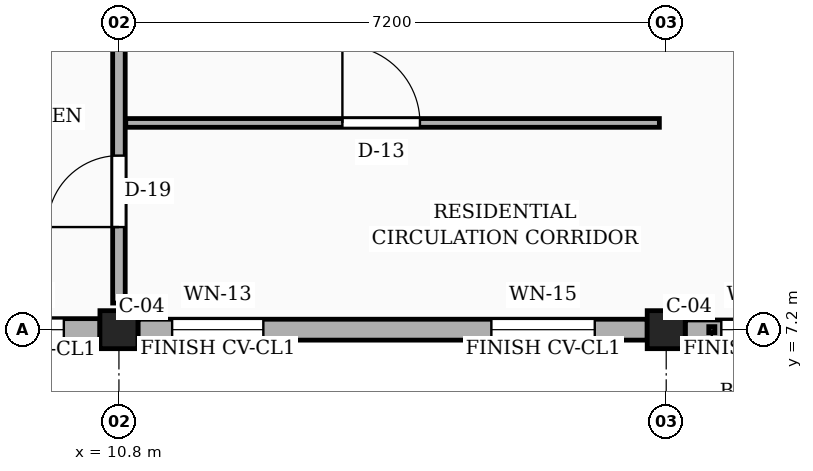
"""IFC4 building model, lengths in metres.
Left out: names, types, materials, properties, quantities, classifications, styles, units other than length and angle.
Written with IfcOpenShell. Run it as: python <this file> out.ifc"""

import sys

from ifc_helpers import new_model, si_unit, direction, frame, frame_2d, origin, origin_2d, place, context, subcontext, project, spatial, rectangle, extrude, element, fill, save


model = new_model("IFC4")
c1 = context("Model", 3, precision=1e-05, world=origin(), true_north=direction((0.0, 1.0)))
c2 = subcontext(c1, "Body", "Model", "MODEL_VIEW")
j1 = project(units=[si_unit("LENGTHUNIT", "METRE"), si_unit("PLANEANGLEUNIT", "RADIAN")], contexts=[c1])
p1 = place(None, origin())
s1 = spatial("IfcSite", under=j1, at=p1, CompositionType="ELEMENT")
p2 = place(p1, origin())
s2 = spatial("IfcBuilding", under=s1, at=p2, CompositionType="ELEMENT")
p3 = place(p2, frame((0.0, 0.0, 32.85)))
s3 = spatial("IfcBuildingStorey", under=s2, at=p3, CompositionType="ELEMENT", Elevation=32.85)
for number, where, z_axis, x_axis in (
    (1, (10.8, 7.2, 0.0), (0.0, 0.0, 1.0), (1.0, 0.0, 0.0)),
    (2, (18.0, 7.2, 0.0), (0.0, 0.0, 1.0), (1.0, 0.0, 0.0)),
):
    element("IfcColumn", number, at=place(p3, frame(where, z_axis=z_axis, x_axis=x_axis)), inside=s3, PredefinedType="COLUMN", context=c2, shape_type="SweptSolid", body=[
        extrude(rectangle(XDim=0.5, YDim=0.5, at=origin_2d()), origin(), (0.0, 0.0, 1.0), 3.15),
    ])
p4 = place(p3, frame((3.85, 7.2, 0.0), z_axis=(0.0, 0.0, 1.0), x_axis=(1.0, 0.0, 0.0)))
e3 = element("IfcWall", 3, at=p4, inside=s3, PredefinedType="SOLIDWALL", context=c2, shape_type="SweptSolid", body=[
    extrude(rectangle(XDim=6.7, YDim=0.29, at=frame_2d((3.35, 0.0))), origin(), (0.0, 0.0, 1.0), 2.44),
])
p5 = place(p4, frame((1.895, 0.0, 0.78)))
e4 = element("IfcOpeningElement", 4, at=p5, cuts=e3, PredefinedType="OPENING", context=c2, shape_type="SweptSolid", body=[
    extrude(rectangle(XDim=1.04, YDim=1.26, at=frame_2d((0.52, 0.63))), frame((0.0, 0.155, 0.0), z_axis=(0.0, -1.0, 0.0), x_axis=(1.0, 0.0, 0.0)), (0.0, 0.0, 1.0), 0.31),
])
p6 = place(p4, frame((5.025, 0.0, 0.78)))
e5 = element("IfcOpeningElement", 5, at=p6, cuts=e3, PredefinedType="OPENING", context=c2, shape_type="SweptSolid", body=[
    extrude(rectangle(XDim=1.2, YDim=1.26, at=frame_2d((0.6, 0.63))), frame((0.0, 0.155, 0.0), z_axis=(0.0, -1.0, 0.0), x_axis=(1.0, 0.0, 0.0)), (0.0, 0.0, 1.0), 0.31),
])
p7 = place(p3, frame((11.05, 7.2, 0.0), z_axis=(0.0, 0.0, 1.0), x_axis=(1.0, 0.0, 0.0)))
e6 = element("IfcWall", 6, at=p7, inside=s3, PredefinedType="SOLIDWALL", context=c2, shape_type="SweptSolid", body=[
    extrude(rectangle(XDim=6.7, YDim=0.275, at=frame_2d((3.35, 0.0))), origin(), (0.0, 0.0, 1.0), 2.44),
])
p8 = place(p7, frame((0.45, 0.0, 0.78)))
e7 = element("IfcOpeningElement", 7, at=p8, cuts=e6, PredefinedType="OPENING", context=c2, shape_type="SweptSolid", body=[
    extrude(rectangle(XDim=1.2, YDim=1.26, at=frame_2d((0.6, 0.63))), frame((0.0, 0.147, 0.0), z_axis=(0.0, -1.0, 0.0), x_axis=(1.0, 0.0, 0.0)), (0.0, 0.0, 1.0), 0.295),
])
p9 = place(p7, frame((4.65, 0.0, 0.78)))
e8 = element("IfcOpeningElement", 8, at=p9, cuts=e6, PredefinedType="OPENING", context=c2, shape_type="SweptSolid", body=[
    extrude(rectangle(XDim=1.36, YDim=1.26, at=frame_2d((0.68, 0.63))), frame((0.0, 0.147, 0.0), z_axis=(0.0, -1.0, 0.0), x_axis=(1.0, 0.0, 0.0)), (0.0, 0.0, 1.0), 0.295),
])
p10 = place(p3, frame((18.25, 7.2, 0.0), z_axis=(0.0, 0.0, 1.0), x_axis=(1.0, 0.0, 0.0)))
e9 = element("IfcWall", 9, at=p10, inside=s3, PredefinedType="SOLIDWALL", context=c2, shape_type="SweptSolid", body=[
    extrude(rectangle(XDim=6.7, YDim=0.255, at=frame_2d((3.35, 0.0))), origin(), (0.0, 0.0, 1.0), 2.44),
])
p11 = place(p10, frame((0.475, 0.0, 0.78)))
e10 = element("IfcOpeningElement", 10, at=p11, cuts=e9, PredefinedType="OPENING", context=c2, shape_type="SweptSolid", body=[
    extrude(rectangle(XDim=1.04, YDim=1.26, at=frame_2d((0.52, 0.63))), frame((0.0, 0.137, 0.0), z_axis=(0.0, -1.0, 0.0), x_axis=(1.0, 0.0, 0.0)), (0.0, 0.0, 1.0), 0.275),
])
p12 = place(p10, frame((3.1, 0.0, 0.78)))
e11 = element("IfcOpeningElement", 11, at=p12, cuts=e9, PredefinedType="OPENING", context=c2, shape_type="SweptSolid", body=[
    extrude(rectangle(XDim=0.9, YDim=1.36, at=frame_2d((0.45, 0.68))), frame((0.0, 0.137, 0.0), z_axis=(0.0, -1.0, 0.0), x_axis=(1.0, 0.0, 0.0)), (0.0, 0.0, 1.0), 0.275),
])
p13 = place(p3, frame((10.8, 7.55, 0.0), z_axis=(0.0, 0.0, 1.0), x_axis=(0.0, 1.0, 0.0)))
e12 = element("IfcWall", 12, at=p13, inside=s3, PredefinedType="PARTITIONING", context=c2, shape_type="SweptSolid", body=[
    extrude(rectangle(XDim=6.5, YDim=0.165, at=frame_2d((3.25, 0.0))), origin(), (0.0, 0.0, 1.0), 2.305),
])
p14 = place(p13, frame((1.0, 0.0, 0.0)))
e13 = element("IfcOpeningElement", 13, at=p14, cuts=e12, PredefinedType="OPENING", context=c2, shape_type="SweptSolid", body=[
    extrude(rectangle(XDim=0.94, YDim=2.12, at=frame_2d((0.47, 1.06))), frame((0.0, 0.093, 0.0), z_axis=(0.0, -1.0, 0.0), x_axis=(1.0, 0.0, 0.0)), (0.0, 0.0, 1.0), 0.185),
])
p15 = place(p3, frame((10.89, 9.92, 0.0), z_axis=(0.0, 0.0, 1.0), x_axis=(1.0, 0.0, 0.0)))
e14 = element("IfcWall", 14, at=p15, inside=s3, PredefinedType="PARTITIONING", context=c2, shape_type="SweptSolid", body=[
    extrude(rectangle(XDim=7.02, YDim=0.115, at=frame_2d((3.51, 0.0))), origin(), (0.0, 0.0, 1.0), 2.305),
])
p16 = place(p15, frame((2.85, 0.0, 0.0)))
e15 = element("IfcOpeningElement", 15, at=p16, cuts=e14, PredefinedType="OPENING", context=c2, shape_type="SweptSolid", body=[
    extrude(rectangle(XDim=1.02, YDim=2.15, at=frame_2d((0.51, 1.075))), frame((0.0, 0.067, 0.0), z_axis=(0.0, -1.0, 0.0), x_axis=(1.0, 0.0, 0.0)), (0.0, 0.0, 1.0), 0.135),
])
p17 = place(p6, origin())
e16 = element("IfcWindow", 16, at=p17, inside=s3, PartitioningType="SINGLE_PANEL", PredefinedType="WINDOW", context=c2, shape_type="SweptSolid", body=[
    extrude(rectangle(XDim=1.2, YDim=1.26, at=frame_2d((0.6, 0.63))), frame((0.0, 0.03, 0.0), z_axis=(0.0, -1.0, 0.0), x_axis=(1.0, 0.0, 0.0)), (0.0, 0.0, 1.0), 0.06),
])
fill(e5, e16)
p18 = place(p8, origin())
e17 = element("IfcWindow", 17, at=p18, inside=s3, PartitioningType="SINGLE_PANEL", PredefinedType="WINDOW", context=c2, shape_type="SweptSolid", body=[
    extrude(rectangle(XDim=1.2, YDim=1.26, at=frame_2d((0.6, 0.63))), frame((0.0, 0.03, 0.0), z_axis=(0.0, -1.0, 0.0), x_axis=(1.0, 0.0, 0.0)), (0.0, 0.0, 1.0), 0.06),
])
fill(e7, e17)
p19 = place(p9, origin())
e18 = element("IfcWindow", 18, at=p19, inside=s3, PartitioningType="SINGLE_PANEL", PredefinedType="WINDOW", context=c2, shape_type="SweptSolid", body=[
    extrude(rectangle(XDim=1.36, YDim=1.26, at=frame_2d((0.68, 0.63))), frame((0.0, 0.03, 0.0), z_axis=(0.0, -1.0, 0.0), x_axis=(1.0, 0.0, 0.0)), (0.0, 0.0, 1.0), 0.06),
])
fill(e8, e18)
p20 = place(p11, origin())
e19 = element("IfcWindow", 19, at=p20, inside=s3, PartitioningType="SINGLE_PANEL", PredefinedType="WINDOW", context=c2, shape_type="SweptSolid", body=[
    extrude(rectangle(XDim=1.04, YDim=1.26, at=frame_2d((0.52, 0.63))), frame((0.0, 0.03, 0.0), z_axis=(0.0, -1.0, 0.0), x_axis=(1.0, 0.0, 0.0)), (0.0, 0.0, 1.0), 0.06),
])
fill(e10, e19)
p21 = place(p14, origin())
e20 = element("IfcDoor", 20, at=p21, inside=s3, OperationType="SINGLE_SWING_LEFT", PredefinedType="DOOR", context=c2, shape_type="SweptSolid", body=[
    extrude(rectangle(XDim=0.94, YDim=2.12, at=frame_2d((0.47, 1.06))), frame((0.0, 0.025, 0.0), z_axis=(0.0, -1.0, 0.0), x_axis=(1.0, 0.0, 0.0)), (0.0, 0.0, 1.0), 0.05),
])
fill(e13, e20)
p22 = place(p16, origin())
e21 = element("IfcDoor", 21, at=p22, inside=s3, OperationType="SINGLE_SWING_LEFT", PredefinedType="DOOR", context=c2, shape_type="SweptSolid", body=[
    extrude(rectangle(XDim=1.02, YDim=2.15, at=frame_2d((0.51, 1.075))), frame((0.0, 0.025, 0.0), z_axis=(0.0, -1.0, 0.0), x_axis=(1.0, 0.0, 0.0)), (0.0, 0.0, 1.0), 0.05),
])
fill(e15, e21)
save(model, sys.argv[1])
